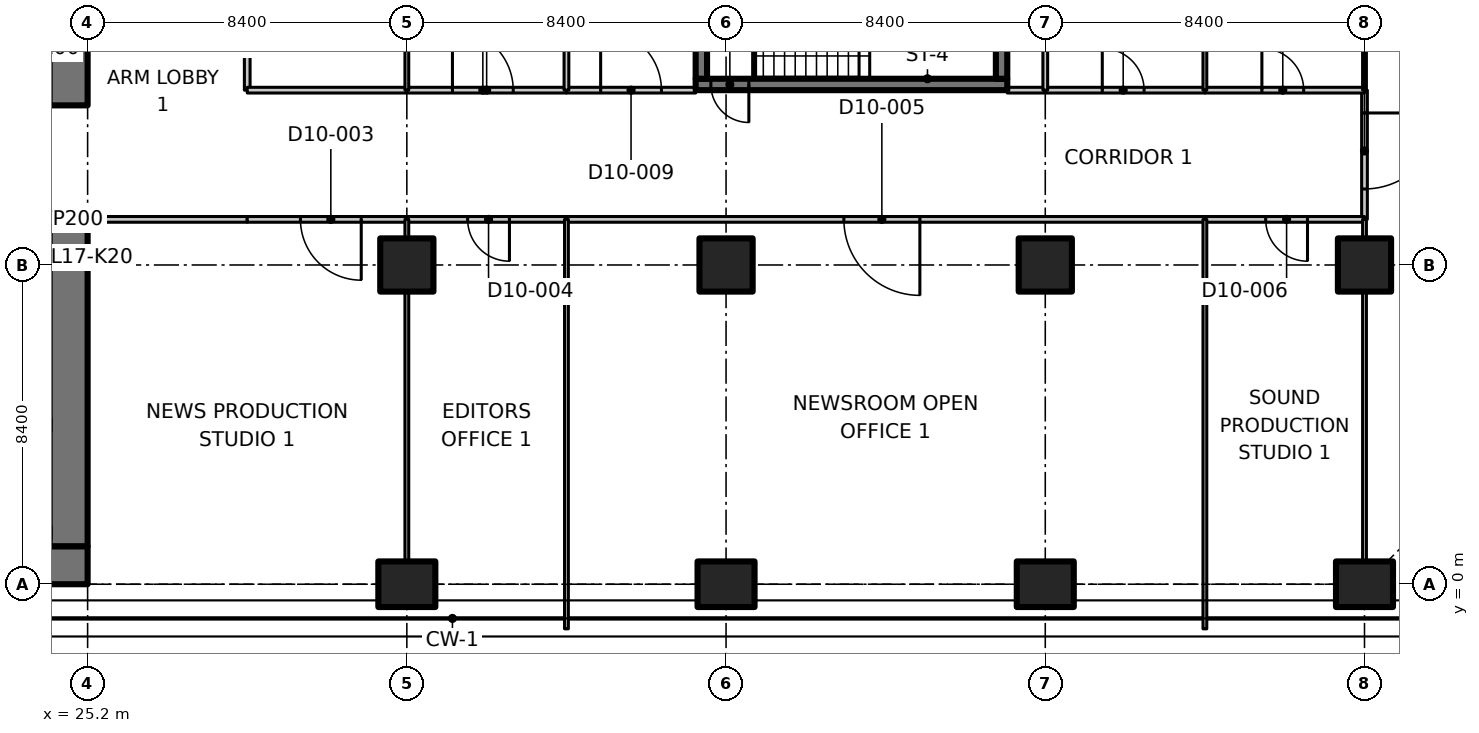
"""IFC4 building model, lengths in metres.
Left out: names, types, materials, properties, quantities, classifications, styles, units other than length and angle.
Written with IfcOpenShell. Run it as: python <this file> out.ifc"""

import sys

from ifc_helpers import new_model, si_unit, direction, frame, frame_2d, origin, origin_2d, place, context, subcontext, project, spatial, polyline, rectangle, outline, extrude, element, fill, save


model = new_model("IFC4")
c1 = context("Model", 3, precision=1e-05, world=origin(), true_north=direction((0.0, 1.0)))
c2 = subcontext(c1, "Body", "Model", "MODEL_VIEW")
j1 = project(units=[si_unit("LENGTHUNIT", "METRE"), si_unit("PLANEANGLEUNIT", "RADIAN")], contexts=[c1])
p1 = place(None, origin())
s1 = spatial("IfcSite", under=j1, at=p1, CompositionType="ELEMENT")
p2 = place(p1, origin())
s2 = spatial("IfcBuilding", under=s1, at=p2, CompositionType="ELEMENT")
p3 = place(p2, frame((0.0, 0.0, 76.1)))
s3 = spatial("IfcBuildingStorey", under=s2, at=p3, CompositionType="ELEMENT", Elevation=76.1)
p4 = place(p3, frame((33.6, 0.0, 0.0), z_axis=(0.0, 0.0, 1.0), x_axis=(0.0, 1.0, 0.0)))
e1 = element("IfcColumn", 1, at=p4, inside=s3, PredefinedType="COLUMN", context=c2, shape_type="SweptSolid", body=[
    extrude(rectangle(XDim=1.2, YDim=1.5, at=origin_2d()), origin(), (0.0, 0.0, 1.0), 3.35),
])
p5 = place(p3, frame((33.6, 8.4, 0.0), z_axis=(0.0, 0.0, 1.0), x_axis=(1.0, 0.0, 0.0)))
e2 = element("IfcColumn", 2, at=p5, inside=s3, PredefinedType="COLUMN", context=c2, shape_type="SweptSolid", body=[
    extrude(rectangle(XDim=1.4, YDim=1.4, at=origin_2d()), origin(), (0.0, 0.0, 1.0), 3.35),
])
p6 = place(p3, frame((42.0, 0.0, 0.0), z_axis=(0.0, 0.0, 1.0), x_axis=(0.0, 1.0, 0.0)))
e3 = element("IfcColumn", 3, at=p6, inside=s3, PredefinedType="COLUMN", context=c2, shape_type="SweptSolid", body=[
    extrude(rectangle(XDim=1.2, YDim=1.5, at=origin_2d()), origin(), (0.0, 0.0, 1.0), 3.35),
])
p7 = place(p3, frame((42.0, 8.4, 0.0), z_axis=(0.0, 0.0, 1.0), x_axis=(1.0, 0.0, 0.0)))
e4 = element("IfcColumn", 4, at=p7, inside=s3, PredefinedType="COLUMN", context=c2, shape_type="SweptSolid", body=[
    extrude(rectangle(XDim=1.4, YDim=1.4, at=origin_2d()), origin(), (0.0, 0.0, 1.0), 3.35),
])
p8 = place(p3, frame((50.4, 0.0, 0.0), z_axis=(0.0, 0.0, 1.0), x_axis=(0.0, 1.0, 0.0)))
e5 = element("IfcColumn", 5, at=p8, inside=s3, PredefinedType="COLUMN", context=c2, shape_type="SweptSolid", body=[
    extrude(rectangle(XDim=1.2, YDim=1.5, at=origin_2d()), origin(), (0.0, 0.0, 1.0), 3.35),
])
p9 = place(p3, frame((50.4, 8.4, 0.0), z_axis=(0.0, 0.0, 1.0), x_axis=(1.0, 0.0, 0.0)))
e6 = element("IfcColumn", 6, at=p9, inside=s3, PredefinedType="COLUMN", context=c2, shape_type="SweptSolid", body=[
    extrude(rectangle(XDim=1.4, YDim=1.4, at=origin_2d()), origin(), (0.0, 0.0, 1.0), 3.35),
])
p10 = place(p3, frame((58.8, 0.0, 0.0), z_axis=(0.0, 0.0, 1.0), x_axis=(0.0, 1.0, 0.0)))
e7 = element("IfcColumn", 7, at=p10, inside=s3, PredefinedType="COLUMN", context=c2, shape_type="SweptSolid", body=[
    extrude(rectangle(XDim=1.2, YDim=1.5, at=origin_2d()), origin(), (0.0, 0.0, 1.0), 3.35),
])
p11 = place(p3, frame((58.8, 8.4, 0.0), z_axis=(0.0, 0.0, 1.0), x_axis=(1.0, 0.0, 0.0)))
e8 = element("IfcColumn", 8, at=p11, inside=s3, PredefinedType="COLUMN", context=c2, shape_type="SweptSolid", body=[
    extrude(rectangle(XDim=1.4, YDim=1.4, at=origin_2d()), origin(), (0.0, 0.0, 1.0), 3.35),
])
p12 = place(p3, frame((6.936, 0.5, 0.0), z_axis=(0.0, 0.0, 1.0), x_axis=(1.0, 0.0, 0.0)))
e9 = element("IfcWall", 9, at=p12, inside=s3, PredefinedType="SHEAR", context=c2, shape_type="SweptSolid", body=[
    extrude(rectangle(XDim=18.264, YDim=1.0, at=frame_2d((9.132, 0.0))), origin(), (0.0, 0.0, 1.0), 3.35),
])
p13 = place(p3, frame((24.7, 1.0, 0.0), z_axis=(0.0, 0.0, 1.0), x_axis=(0.0, 1.0, 0.0)))
e10 = element("IfcWall", 10, at=p13, inside=s3, PredefinedType="SHEAR", context=c2, shape_type="SweptSolid", body=[
    extrude(rectangle(XDim=8.8, YDim=1.0, at=frame_2d((4.4, 0.0))), origin(), (0.0, 0.0, 1.0), 3.35),
])
p14 = place(p3, frame((24.7, 12.6, 0.0), z_axis=(0.0, 0.0, 1.0), x_axis=(0.0, 1.0, 0.0)))
e11 = element("IfcWall", 11, at=p14, inside=s3, PredefinedType="SHEAR", context=c2, shape_type="SweptSolid", body=[
    extrude(rectangle(XDim=3.2, YDim=1.0, at=frame_2d((1.6, 0.0))), origin(), (0.0, 0.0, 1.0), 3.35),
])
p15 = place(p3, frame((49.4, 13.15, 0.0), z_axis=(0.0, 0.0, 1.0), x_axis=(-1.0, 0.0, 0.0)))
e12 = element("IfcWall", 12, at=p15, inside=s3, PredefinedType="SHEAR", context=c2, shape_type="SweptSolid", body=[
    extrude(rectangle(XDim=8.2, YDim=0.3, at=frame_2d((4.1, 0.0))), origin(), (0.0, 0.0, 1.0), 3.35),
])
p16 = place(p15, frame((6.8, 0.0, 0.0)))
e13 = element("IfcOpeningElement", 13, at=p16, cuts=e12, PredefinedType="OPENING", context=c2, shape_type="SweptSolid", body=[
    extrude(rectangle(XDim=1.0, YDim=2.1, at=frame_2d((0.5, 1.05))), frame((0.0, 0.16, 0.0), z_axis=(0.0, -1.0, 0.0), x_axis=(1.0, 0.0, 0.0)), (0.0, 0.0, 1.0), 0.32),
])
for number, where, z_axis, x_axis in (
    (14, (41.35, 13.3, 0.0), (0.0, 0.0, 1.0), (0.0, 1.0, 0.0)),
    (15, (49.25, 13.3, 0.0), (0.0, 0.0, 1.0), (0.0, 1.0, 0.0)),
):
    element("IfcWall", number, at=place(p3, frame(where, z_axis=z_axis, x_axis=x_axis)), inside=s3, PredefinedType="SHEAR", context=c2, shape_type="SweptSolid", body=[
        extrude(rectangle(XDim=2.55, YDim=0.3, at=frame_2d((1.275, 0.0))), origin(), (0.0, 0.0, 1.0), 3.35),
    ])
p17 = place(p3, frame((29.4, 9.6, 0.0), z_axis=(0.0, 0.0, 1.0), x_axis=(-1.0, 0.0, 0.0)))
e16 = element("IfcWall", 16, at=p17, inside=s3, PredefinedType="PARTITIONING", context=c2, shape_type="SweptSolid", body=[
    extrude(rectangle(XDim=4.2, YDim=0.15, at=frame_2d((2.1, 0.0))), origin(), (0.0, 0.0, 1.0), 3.33),
])
p18 = place(p3, frame((29.4, 21.2, 0.0), z_axis=(0.0, 0.0, 1.0), x_axis=(0.0, -1.0, 0.0)))
e17 = element("IfcWall", 17, at=p18, inside=s3, PredefinedType="PARTITIONING", context=c2, shape_type="SweptSolid", body=[
    extrude(rectangle(XDim=8.2, YDim=0.15, at=frame_2d((4.1, 0.0))), origin(), (0.0, 0.0, 1.0), 3.33),
])
p19 = place(p18, frame((3.3, 0.0, 0.0)))
e18 = element("IfcOpeningElement", 18, at=p19, cuts=e17, PredefinedType="OPENING", context=c2, shape_type="SweptSolid", body=[
    extrude(rectangle(XDim=1.6, YDim=2.1, at=frame_2d((0.8, 1.05))), frame((0.0, 0.085, 0.0), z_axis=(0.0, -1.0, 0.0), x_axis=(1.0, 0.0, 0.0)), (0.0, 0.0, 1.0), 0.17),
])
p20 = place(p3, frame((58.8, 13.0, 0.0), z_axis=(0.0, 0.0, 1.0), x_axis=(0.0, -1.0, 0.0)))
e19 = element("IfcWall", 19, at=p20, inside=s3, PredefinedType="PARTITIONING", context=c2, shape_type="SweptSolid", body=[
    extrude(rectangle(XDim=3.4, YDim=0.15, at=frame_2d((1.7, 0.0))), origin(), (0.0, 0.0, 1.0), 3.33),
])
p21 = place(p20, frame((0.6, 0.0, 0.0)))
e20 = element("IfcOpeningElement", 20, at=p21, cuts=e19, PredefinedType="OPENING", context=c2, shape_type="SweptSolid", body=[
    extrude(rectangle(XDim=2.0, YDim=2.4, at=frame_2d((1.0, 1.2))), frame((0.0, 0.085, 0.0), z_axis=(0.0, -1.0, 0.0), x_axis=(1.0, 0.0, 0.0)), (0.0, 0.0, 1.0), 0.17),
])
p22 = place(p3, frame((33.6, 9.6, 0.0), z_axis=(0.0, 0.0, 1.0), x_axis=(-1.0, 0.0, 0.0)))
e21 = element("IfcWall", 21, at=p22, inside=s3, PredefinedType="PARTITIONING", context=c2, shape_type="SweptSolid", body=[
    extrude(rectangle(XDim=4.2, YDim=0.15, at=frame_2d((2.1, 0.0))), origin(), (0.0, 0.0, 1.0), 3.33),
])
p23 = place(p22, frame((1.2, 0.0, 0.0)))
e22 = element("IfcOpeningElement", 22, at=p23, cuts=e21, PredefinedType="OPENING", context=c2, shape_type="SweptSolid", body=[
    extrude(rectangle(XDim=1.6, YDim=2.1, at=frame_2d((0.8, 1.05))), frame((0.0, 0.085, 0.0), z_axis=(0.0, -1.0, 0.0), x_axis=(1.0, 0.0, 0.0)), (0.0, 0.0, 1.0), 0.17),
])
p24 = place(p3, frame((37.8, 9.6, 0.0), z_axis=(0.0, 0.0, 1.0), x_axis=(-1.0, 0.0, 0.0)))
e23 = element("IfcWall", 23, at=p24, inside=s3, PredefinedType="PARTITIONING", context=c2, shape_type="SweptSolid", body=[
    extrude(rectangle(XDim=4.2, YDim=0.15, at=frame_2d((2.1, 0.0))), origin(), (0.0, 0.0, 1.0), 3.33),
])
p25 = place(p24, frame((1.5, 0.0, 0.0)))
e24 = element("IfcOpeningElement", 24, at=p25, cuts=e23, PredefinedType="OPENING", context=c2, shape_type="SweptSolid", body=[
    extrude(rectangle(XDim=1.1, YDim=2.1, at=frame_2d((0.55, 1.05))), frame((0.0, 0.085, 0.0), z_axis=(0.0, -1.0, 0.0), x_axis=(1.0, 0.0, 0.0)), (0.0, 0.0, 1.0), 0.17),
])
p26 = place(p3, frame((54.6, 9.6, 0.0), z_axis=(0.0, 0.0, 1.0), x_axis=(-1.0, 0.0, 0.0)))
e25 = element("IfcWall", 25, at=p26, inside=s3, PredefinedType="PARTITIONING", context=c2, shape_type="SweptSolid", body=[
    extrude(rectangle(XDim=16.8, YDim=0.15, at=frame_2d((8.4, 0.0))), origin(), (0.0, 0.0, 1.0), 3.33),
])
p27 = place(p26, frame((7.5, 0.0, 0.0)))
e26 = element("IfcOpeningElement", 26, at=p27, cuts=e25, PredefinedType="OPENING", context=c2, shape_type="SweptSolid", body=[
    extrude(rectangle(XDim=2.0, YDim=2.4, at=frame_2d((1.0, 1.2))), frame((0.0, 0.085, 0.0), z_axis=(0.0, -1.0, 0.0), x_axis=(1.0, 0.0, 0.0)), (0.0, 0.0, 1.0), 0.17),
])
p28 = place(p3, frame((58.8, 9.6, 0.0), z_axis=(0.0, 0.0, 1.0), x_axis=(-1.0, 0.0, 0.0)))
e27 = element("IfcWall", 27, at=p28, inside=s3, PredefinedType="PARTITIONING", context=c2, shape_type="SweptSolid", body=[
    extrude(rectangle(XDim=4.2, YDim=0.15, at=frame_2d((2.1, 0.0))), origin(), (0.0, 0.0, 1.0), 3.33),
])
p29 = place(p28, frame((1.5, 0.0, 0.0)))
e28 = element("IfcOpeningElement", 28, at=p29, cuts=e27, PredefinedType="OPENING", context=c2, shape_type="SweptSolid", body=[
    extrude(rectangle(XDim=1.1, YDim=2.1, at=frame_2d((0.55, 1.05))), frame((0.0, 0.085, 0.0), z_axis=(0.0, -1.0, 0.0), x_axis=(1.0, 0.0, 0.0)), (0.0, 0.0, 1.0), 0.17),
])
p30 = place(p3, frame((29.4, 13.0, 0.0), z_axis=(0.0, 0.0, 1.0), x_axis=(1.0, 0.0, 0.0)))
e29 = element("IfcWall", 29, at=p30, inside=s3, PredefinedType="PARTITIONING", context=c2, shape_type="SweptSolid", body=[
    extrude(rectangle(XDim=4.2, YDim=0.15, at=frame_2d((2.1, 0.0))), origin(), (0.0, 0.0, 1.0), 3.33),
])
p31 = place(p3, frame((33.6, 13.0, 0.0), z_axis=(0.0, 0.0, 1.0), x_axis=(1.0, 0.0, 0.0)))
e30 = element("IfcWall", 30, at=p31, inside=s3, PredefinedType="PARTITIONING", context=c2, shape_type="SweptSolid", body=[
    extrude(rectangle(XDim=4.2, YDim=0.15, at=frame_2d((2.1, 0.0))), origin(), (0.0, 0.0, 1.0), 3.33),
])
p32 = place(p31, frame((1.2, 0.0, 0.0)))
e31 = element("IfcOpeningElement", 31, at=p32, cuts=e30, PredefinedType="OPENING", context=c2, shape_type="SweptSolid", body=[
    extrude(rectangle(XDim=1.6, YDim=2.1, at=frame_2d((0.8, 1.05))), frame((0.0, 0.085, 0.0), z_axis=(0.0, -1.0, 0.0), x_axis=(1.0, 0.0, 0.0)), (0.0, 0.0, 1.0), 0.17),
])
p33 = place(p3, frame((37.8, 13.0, 0.0), z_axis=(0.0, 0.0, 1.0), x_axis=(1.0, 0.0, 0.0)))
e32 = element("IfcWall", 32, at=p33, inside=s3, PredefinedType="PARTITIONING", context=c2, shape_type="SweptSolid", body=[
    extrude(rectangle(XDim=3.4, YDim=0.15, at=frame_2d((1.7, 0.0))), origin(), (0.0, 0.0, 1.0), 3.33),
])
p34 = place(p33, frame((0.9, 0.0, 0.0)))
e33 = element("IfcOpeningElement", 33, at=p34, cuts=e32, PredefinedType="OPENING", context=c2, shape_type="SweptSolid", body=[
    extrude(rectangle(XDim=1.6, YDim=2.1, at=frame_2d((0.8, 1.05))), frame((0.0, 0.085, 0.0), z_axis=(0.0, -1.0, 0.0), x_axis=(1.0, 0.0, 0.0)), (0.0, 0.0, 1.0), 0.17),
])
p35 = place(p3, frame((49.4, 13.0, 0.0), z_axis=(0.0, 0.0, 1.0), x_axis=(1.0, 0.0, 0.0)))
e34 = element("IfcWall", 34, at=p35, inside=s3, PredefinedType="PARTITIONING", context=c2, shape_type="SweptSolid", body=[
    extrude(rectangle(XDim=1.0, YDim=0.15, at=frame_2d((0.5, 0.0))), origin(), (0.0, 0.0, 1.0), 3.33),
])
p36 = place(p3, frame((50.4, 13.0, 0.0), z_axis=(0.0, 0.0, 1.0), x_axis=(1.0, 0.0, 0.0)))
e35 = element("IfcWall", 35, at=p36, inside=s3, PredefinedType="PARTITIONING", context=c2, shape_type="SweptSolid", body=[
    extrude(rectangle(XDim=4.2, YDim=0.15, at=frame_2d((2.1, 0.0))), origin(), (0.0, 0.0, 1.0), 3.33),
])
p37 = place(p36, frame((1.5, 0.0, 0.0)))
e36 = element("IfcOpeningElement", 36, at=p37, cuts=e35, PredefinedType="OPENING", context=c2, shape_type="SweptSolid", body=[
    extrude(rectangle(XDim=1.1, YDim=2.1, at=frame_2d((0.55, 1.05))), frame((0.0, 0.085, 0.0), z_axis=(0.0, -1.0, 0.0), x_axis=(1.0, 0.0, 0.0)), (0.0, 0.0, 1.0), 0.17),
])
p38 = place(p3, frame((54.6, 13.0, 0.0), z_axis=(0.0, 0.0, 1.0), x_axis=(1.0, 0.0, 0.0)))
e37 = element("IfcWall", 37, at=p38, inside=s3, PredefinedType="PARTITIONING", context=c2, shape_type="SweptSolid", body=[
    extrude(rectangle(XDim=4.2, YDim=0.15, at=frame_2d((2.1, 0.0))), origin(), (0.0, 0.0, 1.0), 3.33),
])
p39 = place(p38, frame((1.5, 0.0, 0.0)))
e38 = element("IfcOpeningElement", 38, at=p39, cuts=e37, PredefinedType="OPENING", context=c2, shape_type="SweptSolid", body=[
    extrude(rectangle(XDim=1.1, YDim=2.1, at=frame_2d((0.55, 1.05))), frame((0.0, 0.085, 0.0), z_axis=(0.0, -1.0, 0.0), x_axis=(1.0, 0.0, 0.0)), (0.0, 0.0, 1.0), 0.17),
])
p40 = place(p3, frame((58.8, 0.62, 0.0), z_axis=(0.0, 0.0, 1.0), x_axis=(0.0, 1.0, 0.0)))
e39 = element("IfcWall", 39, at=p40, inside=s3, PredefinedType="PARTITIONING", context=c2, shape_type="SweptSolid", body=[
    extrude(rectangle(XDim=7.06, YDim=0.1, at=frame_2d((3.53, 0.0))), origin(), (0.0, 0.0, 1.0), 3.33),
])
p41 = place(p3, frame((58.8, 9.12, 0.0), z_axis=(0.0, 0.0, 1.0), x_axis=(0.0, 1.0, 0.0)))
e40 = element("IfcWall", 40, at=p41, inside=s3, PredefinedType="PARTITIONING", context=c2, shape_type="SweptSolid", body=[
    extrude(rectangle(XDim=0.48, YDim=0.1, at=frame_2d((0.24, 0.0))), origin(), (0.0, 0.0, 1.0), 3.33),
])
p42 = place(p3, frame((58.8, 13.0, 0.0), z_axis=(0.0, 0.0, 1.0), x_axis=(0.0, 1.0, 0.0)))
e41 = element("IfcWall", 41, at=p42, inside=s3, PredefinedType="PARTITIONING", context=c2, shape_type="SweptSolid", body=[
    extrude(rectangle(XDim=3.08, YDim=0.1, at=frame_2d((1.54, 0.0))), origin(), (0.0, 0.0, 1.0), 3.33),
])
p43 = place(p3, frame((33.6, 9.6, 0.0), z_axis=(0.0, 0.0, 1.0), x_axis=(0.0, -1.0, 0.0)))
e42 = element("IfcWall", 42, at=p43, inside=s3, PredefinedType="PARTITIONING", context=c2, shape_type="SweptSolid", body=[
    extrude(rectangle(XDim=0.48, YDim=0.1, at=frame_2d((0.24, 0.0))), origin(), (0.0, 0.0, 1.0), 3.33),
])
p44 = place(p3, frame((33.6, 7.68, 0.0), z_axis=(0.0, 0.0, 1.0), x_axis=(0.0, -1.0, 0.0)))
e43 = element("IfcWall", 43, at=p44, inside=s3, PredefinedType="PARTITIONING", context=c2, shape_type="SweptSolid", body=[
    extrude(rectangle(XDim=7.06, YDim=0.1, at=frame_2d((3.53, 0.0))), origin(), (0.0, 0.0, 1.0), 3.33),
])
for number, where, z_axis, x_axis in (
    (44, (37.8, 9.6, 0.0), (0.0, 0.0, 1.0), (0.0, -1.0, 0.0)),
    (45, (54.6, 9.6, 0.0), (0.0, 0.0, 1.0), (0.0, -1.0, 0.0)),
):
    element("IfcWall", number, at=place(p3, frame(where, z_axis=z_axis, x_axis=x_axis)), inside=s3, PredefinedType="PARTITIONING", context=c2, shape_type="SweptSolid", body=[
        extrude(outline(polyline([(0.0, 0.0), (10.774, 0.0), (10.774, 3.33), (10.7, 3.33), (10.05, 3.33), (10.048, 2.98), (9.152, 2.98), (9.15, 3.33), (0.0, 3.33), (0.0, 0.0)])), frame((0.0, 0.05, 0.0), z_axis=(0.0, -1.0, 0.0), x_axis=(1.0, 0.0, 0.0)), (0.0, 0.0, 1.0), 0.1),
    ])
p45 = place(p3, frame((33.6, 16.08, 0.0), z_axis=(0.0, 0.0, 1.0), x_axis=(0.0, -1.0, 0.0)))
e46 = element("IfcWall", 46, at=p45, inside=s3, PredefinedType="PARTITIONING", context=c2, shape_type="SweptSolid", body=[
    extrude(rectangle(XDim=3.08, YDim=0.1, at=frame_2d((1.54, 0.0))), origin(), (0.0, 0.0, 1.0), 3.33),
])
p46 = place(p3, frame((37.8, 30.526, 0.0), z_axis=(0.0, 0.0, 1.0), x_axis=(0.0, -1.0, 0.0)))
e47 = element("IfcWall", 47, at=p46, inside=s3, PredefinedType="PARTITIONING", context=c2, shape_type="SweptSolid", body=[
    extrude(outline(polyline([(0.0, 0.0), (17.526, 0.0), (17.526, 3.33), (5.776, 3.33), (5.774, 2.98), (4.878, 2.98), (4.876, 3.33), (0.283, 3.33), (0.0, 3.33), (0.0, 0.0)])), frame((0.0, 0.062, 0.0), z_axis=(0.0, -1.0, 0.0), x_axis=(1.0, 0.0, 0.0)), (0.0, 0.0, 1.0), 0.125),
])
p47 = place(p3, frame((50.4, 16.08, 0.0), z_axis=(0.0, 0.0, 1.0), x_axis=(0.0, -1.0, 0.0)))
e48 = element("IfcWall", 48, at=p47, inside=s3, PredefinedType="PARTITIONING", context=c2, shape_type="SweptSolid", body=[
    extrude(rectangle(XDim=3.08, YDim=0.125, at=frame_2d((1.54, 0.0))), origin(), (0.0, 0.0, 1.0), 3.33),
])
p48 = place(p3, frame((54.6, 26.565, 0.0), z_axis=(0.0, 0.0, 1.0), x_axis=(0.0, -1.0, 0.0)))
e49 = element("IfcWall", 49, at=p48, inside=s3, PredefinedType="PARTITIONING", context=c2, shape_type="SweptSolid", body=[
    extrude(outline(polyline([(0.0, 0.0), (13.565, 0.0), (13.565, 3.33), (1.815, 3.33), (1.813, 2.98), (0.917, 2.98), (0.915, 3.33), (0.265, 3.33), (0.0, 3.33), (0.0, 0.0)])), frame((0.0, 0.05, 0.0), z_axis=(0.0, -1.0, 0.0), x_axis=(1.0, 0.0, 0.0)), (0.0, 0.0, 1.0), 0.1),
])
p49 = place(p16, origin())
e50 = element("IfcDoor", 50, at=p49, inside=s3, OperationType="SINGLE_SWING_LEFT", PredefinedType="DOOR", context=c2, shape_type="SweptSolid", body=[
    extrude(rectangle(XDim=1.0, YDim=2.1, at=frame_2d((0.5, 1.05))), frame((0.0, 0.025, 0.0), z_axis=(0.0, -1.0, 0.0), x_axis=(1.0, 0.0, 0.0)), (0.0, 0.0, 1.0), 0.05),
])
fill(e13, e50)
p50 = place(p21, origin())
e51 = element("IfcDoor", 51, at=p50, inside=s3, OperationType="DOUBLE_DOOR_SINGLE_SWING", PredefinedType="DOOR", context=c2, shape_type="SweptSolid", body=[
    extrude(rectangle(XDim=2.0, YDim=2.4, at=frame_2d((1.0, 1.2))), frame((0.0, 0.025, 0.0), z_axis=(0.0, -1.0, 0.0), x_axis=(1.0, 0.0, 0.0)), (0.0, 0.0, 1.0), 0.05),
])
fill(e20, e51)
p51 = place(p23, origin())
e52 = element("IfcDoor", 52, at=p51, inside=s3, OperationType="DOUBLE_DOOR_SINGLE_SWING", PredefinedType="DOOR", context=c2, shape_type="SweptSolid", body=[
    extrude(rectangle(XDim=1.6, YDim=2.1, at=frame_2d((0.8, 1.05))), frame((0.0, 0.025, 0.0), z_axis=(0.0, -1.0, 0.0), x_axis=(1.0, 0.0, 0.0)), (0.0, 0.0, 1.0), 0.05),
])
fill(e22, e52)
p52 = place(p25, origin())
e53 = element("IfcDoor", 53, at=p52, inside=s3, OperationType="SINGLE_SWING_LEFT", PredefinedType="DOOR", context=c2, shape_type="SweptSolid", body=[
    extrude(rectangle(XDim=1.1, YDim=2.1, at=frame_2d((0.55, 1.05))), frame((0.0, 0.025, 0.0), z_axis=(0.0, -1.0, 0.0), x_axis=(1.0, 0.0, 0.0)), (0.0, 0.0, 1.0), 0.05),
])
fill(e24, e53)
p53 = place(p27, origin())
e54 = element("IfcDoor", 54, at=p53, inside=s3, OperationType="DOUBLE_DOOR_SINGLE_SWING", PredefinedType="DOOR", context=c2, shape_type="SweptSolid", body=[
    extrude(rectangle(XDim=2.0, YDim=2.4, at=frame_2d((1.0, 1.2))), frame((0.0, 0.025, 0.0), z_axis=(0.0, -1.0, 0.0), x_axis=(1.0, 0.0, 0.0)), (0.0, 0.0, 1.0), 0.05),
])
fill(e26, e54)
p54 = place(p29, origin())
e55 = element("IfcDoor", 55, at=p54, inside=s3, OperationType="SINGLE_SWING_LEFT", PredefinedType="DOOR", context=c2, shape_type="SweptSolid", body=[
    extrude(rectangle(XDim=1.1, YDim=2.1, at=frame_2d((0.55, 1.05))), frame((0.0, 0.025, 0.0), z_axis=(0.0, -1.0, 0.0), x_axis=(1.0, 0.0, 0.0)), (0.0, 0.0, 1.0), 0.05),
])
fill(e28, e55)
p55 = place(p32, origin())
e56 = element("IfcDoor", 56, at=p55, inside=s3, OperationType="DOUBLE_DOOR_SINGLE_SWING", PredefinedType="DOOR", context=c2, shape_type="SweptSolid", body=[
    extrude(rectangle(XDim=1.6, YDim=2.1, at=frame_2d((0.8, 1.05))), frame((0.0, 0.025, 0.0), z_axis=(0.0, -1.0, 0.0), x_axis=(1.0, 0.0, 0.0)), (0.0, 0.0, 1.0), 0.05),
])
fill(e31, e56)
p56 = place(p34, origin())
e57 = element("IfcDoor", 57, at=p56, inside=s3, OperationType="DOUBLE_DOOR_SINGLE_SWING", PredefinedType="DOOR", context=c2, shape_type="SweptSolid", body=[
    extrude(rectangle(XDim=1.6, YDim=2.1, at=frame_2d((0.8, 1.05))), frame((0.0, 0.025, 0.0), z_axis=(0.0, -1.0, 0.0), x_axis=(1.0, 0.0, 0.0)), (0.0, 0.0, 1.0), 0.05),
])
fill(e33, e57)
p57 = place(p37, origin())
e58 = element("IfcDoor", 58, at=p57, inside=s3, OperationType="SINGLE_SWING_LEFT", PredefinedType="DOOR", context=c2, shape_type="SweptSolid", body=[
    extrude(rectangle(XDim=1.1, YDim=2.1, at=frame_2d((0.55, 1.05))), frame((0.0, 0.025, 0.0), z_axis=(0.0, -1.0, 0.0), x_axis=(1.0, 0.0, 0.0)), (0.0, 0.0, 1.0), 0.05),
])
fill(e36, e58)
p58 = place(p39, origin())
e59 = element("IfcDoor", 59, at=p58, inside=s3, OperationType="SINGLE_SWING_LEFT", PredefinedType="DOOR", context=c2, shape_type="SweptSolid", body=[
    extrude(rectangle(XDim=1.1, YDim=2.1, at=frame_2d((0.55, 1.05))), frame((0.0, 0.025, 0.0), z_axis=(0.0, -1.0, 0.0), x_axis=(1.0, 0.0, 0.0)), (0.0, 0.0, 1.0), 0.05),
])
fill(e38, e59)
save(model, sys.argv[1])
